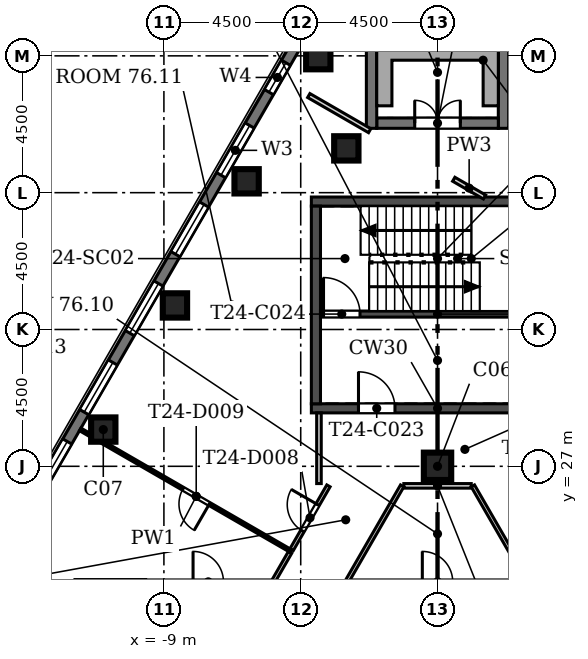
"""IFC4 building model, lengths in metres.
Left out: names, types, materials, properties, quantities, classifications, styles, units other than length and angle.
Written with IfcOpenShell. Run it as: python <this file> out.ifc"""

import sys

from ifc_helpers import new_model, si_unit, direction, frame, frame_2d, origin, origin_2d, place, context, subcontext, project, spatial, polyline, rectangle, outline, extrude, element, fill, save


model = new_model("IFC4")
c1 = context("Model", 3, precision=1e-05, world=origin(), true_north=direction((0.0, 1.0)))
c2 = subcontext(c1, "Body", "Model", "MODEL_VIEW")
j1 = project(units=[si_unit("LENGTHUNIT", "METRE"), si_unit("PLANEANGLEUNIT", "RADIAN")], contexts=[c1])
p1 = place(None, origin())
s1 = spatial("IfcSite", under=j1, at=p1, CompositionType="ELEMENT")
p2 = place(p1, origin())
s2 = spatial("IfcBuilding", under=s1, at=p2, CompositionType="ELEMENT")
p3 = place(p2, frame((0.0, 0.0, 335.1)))
s3 = spatial("IfcBuildingStorey", under=s2, at=p3, CompositionType="ELEMENT", Elevation=335.1)
for number, where, z_axis, x_axis in (
    (1, (-3.0, 37.457, 0.0), (0.0, 0.0, 1.0), (1.0, 0.0, 0.0)),
    (2, (-3.923, 40.457, 0.0), (0.0, 0.0, 1.0), (1.0, 0.0, 0.0)),
    (3, (-6.28, 36.374, 0.0), (0.0, 0.0, 1.0), (1.0, 0.0, 0.0)),
    (4, (-8.637, 32.291, 0.0), (0.0, 0.0, 1.0), (1.0, 0.0, 0.0)),
    (5, (-10.994, 28.208, 0.0), (0.0, 0.0, 1.0), (1.0, 0.0, 0.0)),
):
    element("IfcColumn", number, at=place(p3, frame(where, z_axis=z_axis, x_axis=x_axis)), inside=s3, PredefinedType="COLUMN", context=c2, shape_type="SweptSolid", body=[
        extrude(rectangle(XDim=0.8, YDim=0.8, at=origin_2d()), origin(), (0.0, 0.0, 1.0), 4.2),
    ])
p4 = place(p3, frame((0.0, 27.0, 0.0), z_axis=(0.0, 0.0, 1.0), x_axis=(1.0, 0.0, 0.0)))
e6 = element("IfcColumn", 6, at=p4, inside=s3, PredefinedType="COLUMN", context=c2, shape_type="SweptSolid", body=[
    extrude(rectangle(XDim=0.9, YDim=0.9, at=origin_2d()), origin(), (0.0, 0.0, 1.0), 4.2),
])
p5 = place(p3, origin())
e7 = element("IfcWall", 7, at=p5, inside=s3, PredefinedType="SOLIDWALL", context=c2, shape_type="SweptSolid", body=[
    extrude(outline(polyline([(2.341, 38.116), (2.0, 38.116), (2.0, 41.458), (2.0, 41.458), (2.341, 41.117), (2.341, 38.116)])), origin(), (0.0, 0.0, 1.0), 3.8),
])
p6 = place(p3, frame((2.0, 38.287, 0.0), z_axis=(0.0, 0.0, 1.0), x_axis=(-1.0, 0.0, 0.0)))
e8 = element("IfcWall", 8, at=p6, inside=s3, PredefinedType="SOLIDWALL", context=c2, shape_type="SweptSolid", body=[
    extrude(rectangle(XDim=4.0, YDim=0.34, at=frame_2d((2.0, 0.0))), origin(), (0.0, 0.0, 1.0), 3.8),
])
p7 = place(p6, frame((1.25, 0.0, 0.0)))
e9 = element("IfcOpeningElement", 9, at=p7, cuts=e8, PredefinedType="OPENING", context=c2, shape_type="SweptSolid", body=[
    extrude(rectangle(XDim=1.5, YDim=2.4, at=frame_2d((0.75, 1.2))), frame((0.0, 0.18, 0.0), z_axis=(0.0, -1.0, 0.0), x_axis=(1.0, 0.0, 0.0)), (0.0, 0.0, 1.0), 0.36),
])
p8 = place(p3, origin())
e10 = element("IfcWall", 10, at=p8, inside=s3, PredefinedType="SOLIDWALL", context=c2, shape_type="SweptSolid", body=[
    extrude(outline(polyline([(-2.0, 41.458), (-2.0, 38.116), (-2.341, 38.116), (-2.341, 41.117), (-2.0, 41.458), (-2.0, 41.458)])), origin(), (0.0, 0.0, 1.0), 3.8),
])
p9 = place(p3, frame((-4.353, 41.372, 0.0), z_axis=(0.0, 0.0, 1.0), x_axis=(-0.500001731347, -0.866024404189, 0.0)))
e11 = element("IfcWall", 11, at=p9, inside=s3, PredefinedType="SOLIDWALL", context=c2, shape_type="SweptSolid", body=[
    extrude(rectangle(XDim=38.87, YDim=0.34, at=frame_2d((19.435, 0.0))), origin(), (0.0, 0.0, 1.0), 3.8),
])
p10 = place(p9, frame((3.653, 0.0, 0.9)))
e12 = element("IfcOpeningElement", 12, at=p10, cuts=e11, PredefinedType="OPENING", context=c2, shape_type="SweptSolid", body=[
    extrude(rectangle(XDim=1.885, YDim=2.6, at=frame_2d((0.942, 1.3))), frame((0.0, 0.18, 0.0), z_axis=(0.0, -1.0, 0.0), x_axis=(1.0, 0.0, 0.0)), (0.0, 0.0, 1.0), 0.36),
])
p11 = place(p9, frame((6.653, 0.0, 0.9)))
e13 = element("IfcOpeningElement", 13, at=p11, cuts=e11, PredefinedType="OPENING", context=c2, shape_type="SweptSolid", body=[
    extrude(rectangle(XDim=1.885, YDim=2.6, at=frame_2d((0.942, 1.3))), frame((0.0, 0.18, 0.0), z_axis=(0.0, -1.0, 0.0), x_axis=(1.0, 0.0, 0.0)), (0.0, 0.0, 1.0), 0.36),
])
p12 = place(p9, frame((9.653, 0.0, 0.9)))
e14 = element("IfcOpeningElement", 14, at=p12, cuts=e11, PredefinedType="OPENING", context=c2, shape_type="SweptSolid", body=[
    extrude(rectangle(XDim=1.885, YDim=2.6, at=frame_2d((0.942, 1.3))), frame((0.0, 0.18, 0.0), z_axis=(0.0, -1.0, 0.0), x_axis=(1.0, 0.0, 0.0)), (0.0, 0.0, 1.0), 0.36),
])
p13 = place(p9, frame((12.653, 0.0, 0.9)))
e15 = element("IfcOpeningElement", 15, at=p13, cuts=e11, PredefinedType="OPENING", context=c2, shape_type="SweptSolid", body=[
    extrude(rectangle(XDim=1.885, YDim=2.6, at=frame_2d((0.942, 1.3))), frame((0.0, 0.18, 0.0), z_axis=(0.0, -1.0, 0.0), x_axis=(1.0, 0.0, 0.0)), (0.0, 0.0, 1.0), 0.36),
])
p14 = place(p9, frame((15.653, 0.0, 0.9)))
e16 = element("IfcOpeningElement", 16, at=p14, cuts=e11, PredefinedType="OPENING", context=c2, shape_type="SweptSolid", body=[
    extrude(rectangle(XDim=1.885, YDim=2.6, at=frame_2d((0.942, 1.3))), frame((0.0, 0.18, 0.0), z_axis=(0.0, -1.0, 0.0), x_axis=(1.0, 0.0, 0.0)), (0.0, 0.0, 1.0), 0.36),
])
p15 = place(p9, frame((18.653, 0.0, 0.9)))
e17 = element("IfcOpeningElement", 17, at=p15, cuts=e11, PredefinedType="OPENING", context=c2, shape_type="SweptSolid", body=[
    extrude(rectangle(XDim=1.885, YDim=2.6, at=frame_2d((0.942, 1.3))), frame((0.0, 0.18, 0.0), z_axis=(0.0, -1.0, 0.0), x_axis=(1.0, 0.0, 0.0)), (0.0, 0.0, 1.0), 0.36),
])
p16 = place(p9, frame((21.653, 0.0, 0.9)))
e18 = element("IfcOpeningElement", 18, at=p16, cuts=e11, PredefinedType="OPENING", context=c2, shape_type="SweptSolid", body=[
    extrude(rectangle(XDim=1.885, YDim=2.6, at=frame_2d((0.942, 1.3))), frame((0.0, 0.18, 0.0), z_axis=(0.0, -1.0, 0.0), x_axis=(1.0, 0.0, 0.0)), (0.0, 0.0, 1.0), 0.36),
])
p17 = place(p9, frame((24.653, 0.0, 0.9)))
e19 = element("IfcOpeningElement", 19, at=p17, cuts=e11, PredefinedType="OPENING", context=c2, shape_type="SweptSolid", body=[
    extrude(rectangle(XDim=1.885, YDim=2.6, at=frame_2d((0.942, 1.3))), frame((0.0, 0.18, 0.0), z_axis=(0.0, -1.0, 0.0), x_axis=(1.0, 0.0, 0.0)), (0.0, 0.0, 1.0), 0.36),
])
p18 = place(p9, frame((27.653, 0.0, 0.9)))
e20 = element("IfcOpeningElement", 20, at=p18, cuts=e11, PredefinedType="OPENING", context=c2, shape_type="SweptSolid", body=[
    extrude(rectangle(XDim=1.885, YDim=2.6, at=frame_2d((0.942, 1.3))), frame((0.0, 0.18, 0.0), z_axis=(0.0, -1.0, 0.0), x_axis=(1.0, 0.0, 0.0)), (0.0, 0.0, 1.0), 0.36),
])
p19 = place(p9, frame((30.653, 0.0, 0.9)))
e21 = element("IfcOpeningElement", 21, at=p19, cuts=e11, PredefinedType="OPENING", context=c2, shape_type="SweptSolid", body=[
    extrude(rectangle(XDim=1.885, YDim=2.6, at=frame_2d((0.942, 1.3))), frame((0.0, 0.18, 0.0), z_axis=(0.0, -1.0, 0.0), x_axis=(1.0, 0.0, 0.0)), (0.0, 0.0, 1.0), 0.36),
])
p20 = place(p9, frame((33.653, 0.0, 0.9)))
e22 = element("IfcOpeningElement", 22, at=p20, cuts=e11, PredefinedType="OPENING", context=c2, shape_type="SweptSolid", body=[
    extrude(rectangle(XDim=1.885, YDim=2.6, at=frame_2d((0.942, 1.3))), frame((0.0, 0.18, 0.0), z_axis=(0.0, -1.0, 0.0), x_axis=(1.0, 0.0, 0.0)), (0.0, 0.0, 1.0), 0.36),
])
p21 = place(p9, frame((1.269, 0.0, 0.9)))
e23 = element("IfcOpeningElement", 23, at=p21, cuts=e11, PredefinedType="OPENING", context=c2, shape_type="SweptSolid", body=[
    extrude(rectangle(XDim=1.115, YDim=2.4, at=frame_2d((0.558, 1.2))), frame((0.0, 0.18, 0.0), z_axis=(0.0, -1.0, 0.0), x_axis=(1.0, 0.0, 0.0)), (0.0, 0.0, 1.0), 0.36),
])
p22 = place(p9, frame((36.646, 0.0, 0.9)))
e24 = element("IfcOpeningElement", 24, at=p22, cuts=e11, PredefinedType="OPENING", context=c2, shape_type="SweptSolid", body=[
    extrude(rectangle(XDim=1.115, YDim=2.4, at=frame_2d((0.558, 1.2))), frame((0.0, 0.18, 0.0), z_axis=(0.0, -1.0, 0.0), x_axis=(1.0, 0.0, 0.0)), (0.0, 0.0, 1.0), 0.36),
])
p23 = place(p3, origin())
e25 = element("IfcWall", 25, at=p23, inside=s3, PredefinedType="USERDEFINED", context=c2, shape_type="SweptSolid", body=[
    extrude(outline(polyline([(-1.5, 40.857), (-2.0, 40.857), (-2.0, 40.357), (-2.0, 38.857), (-1.5, 38.857), (-1.5, 40.357), (1.5, 40.357), (1.5, 38.857), (2.0, 38.857), (2.0, 40.357), (2.0, 40.857), (1.5, 40.857), (-1.5, 40.857)])), origin(), (0.0, 0.0, 1.0), 1.1),
])
p24 = place(p3, frame((-4.15, 28.907, -0.4), z_axis=(0.0, 0.0, 1.0), x_axis=(1.0, 0.0, 0.0)))
e26 = element("IfcWall", 26, at=p24, inside=s3, PredefinedType="SOLIDWALL", context=c2, shape_type="SweptSolid", body=[
    extrude(rectangle(XDim=8.3, YDim=0.3, at=frame_2d((4.15, 0.0))), origin(), (0.0, 0.0, 1.0), 4.2),
])
p25 = place(p24, frame((1.55, 0.0, 0.4)))
e27 = element("IfcOpeningElement", 27, at=p25, cuts=e26, PredefinedType="OPENING", context=c2, shape_type="SweptSolid", body=[
    extrude(rectangle(XDim=1.2, YDim=2.1, at=frame_2d((0.6, 1.05))), frame((0.0, 0.16, 0.0), z_axis=(0.0, -1.0, 0.0), x_axis=(1.0, 0.0, 0.0)), (0.0, 0.0, 1.0), 0.32),
])
p26 = place(p3, frame((-4.15, 35.707, -0.4), z_axis=(0.0, 0.0, 1.0), x_axis=(1.0, 0.0, 0.0)))
e28 = element("IfcWall", 28, at=p26, inside=s3, PredefinedType="SOLIDWALL", context=c2, shape_type="SweptSolid", body=[
    extrude(rectangle(XDim=8.3, YDim=0.3, at=frame_2d((4.15, 0.0))), origin(), (0.0, 0.0, 1.0), 4.2),
])
p27 = place(p3, frame((-4.0, 29.057, -0.4), z_axis=(0.0, 0.0, 1.0), x_axis=(0.0, 1.0, 0.0)))
e29 = element("IfcWall", 29, at=p27, inside=s3, PredefinedType="SOLIDWALL", context=c2, shape_type="SweptSolid", body=[
    extrude(rectangle(XDim=6.5, YDim=0.3, at=frame_2d((3.25, 0.0))), origin(), (0.0, 0.0, 1.0), 4.2),
])
p28 = place(p3, frame((-3.85, 32.007, -0.4), z_axis=(0.0, 0.0, 1.0), x_axis=(1.0, 0.0, 0.0)))
e30 = element("IfcWall", 30, at=p28, inside=s3, PredefinedType="SOLIDWALL", context=c2, shape_type="SweptSolid", body=[
    extrude(rectangle(XDim=7.7, YDim=0.2, at=frame_2d((3.85, 0.0))), origin(), (0.0, 0.0, 1.0), 4.2),
])
p29 = place(p28, frame((0.1, 0.0, 0.4)))
e31 = element("IfcOpeningElement", 31, at=p29, cuts=e30, PredefinedType="OPENING", context=c2, shape_type="SweptSolid", body=[
    extrude(rectangle(XDim=1.2, YDim=2.1, at=frame_2d((0.6, 1.05))), frame((0.0, 0.11, 0.0), z_axis=(0.0, -1.0, 0.0), x_axis=(1.0, 0.0, 0.0)), (0.0, 0.0, 1.0), 0.22),
])
p30 = place(p3, frame((1.109, 26.357, 0.0), z_axis=(0.0, 0.0, 1.0), x_axis=(-1.0, 0.0, 0.0)))
e32 = element("IfcWall", 32, at=p30, inside=s3, PredefinedType="PARTITIONING", context=c2, shape_type="SweptSolid", body=[
    extrude(rectangle(XDim=2.218, YDim=0.15, at=frame_2d((1.109, 0.0))), origin(), (0.0, 0.0, 1.0), 3.8),
])
p31 = place(p3, frame((-3.9, 26.432, 0.0), z_axis=(0.0, 0.0, 1.0), x_axis=(0.0, 1.0, 0.0)))
e33 = element("IfcWall", 33, at=p31, inside=s3, PredefinedType="PARTITIONING", context=c2, shape_type="SweptSolid", body=[
    extrude(rectangle(XDim=2.325, YDim=0.15, at=frame_2d((1.163, 0.0))), origin(), (0.0, 0.0, 1.0), 3.8),
])
p32 = place(p3, frame((-1.163, 26.357, 0.0), z_axis=(0.0, 0.0, 1.0), x_axis=(-0.500014248385, -0.866017177319, 0.0)))
e34 = element("IfcWall", 34, at=p32, inside=s3, PredefinedType="PARTITIONING", context=c2, shape_type="SweptSolid", body=[
    extrude(rectangle(XDim=3.646, YDim=0.125, at=frame_2d((1.823, 0.0))), origin(), (0.0, 0.0, 1.0), 3.8),
])
p33 = place(p3, frame((-4.8, 24.258, 0.0), z_axis=(0.0, 0.0, 1.0), x_axis=(0.499995647607, 0.866027916625, 0.0)))
e35 = element("IfcWall", 35, at=p33, inside=s3, PredefinedType="PARTITIONING", context=c2, shape_type="SweptSolid", body=[
    extrude(rectangle(XDim=2.424, YDim=0.125, at=frame_2d((1.212, 0.0))), origin(), (0.0, 0.0, 1.0), 3.8),
])
p34 = place(p33, frame((0.712, 0.0, 0.0)))
e36 = element("IfcOpeningElement", 36, at=p34, cuts=e35, PredefinedType="OPENING", context=c2, shape_type="SweptSolid", body=[
    extrude(rectangle(XDim=1.0, YDim=2.1, at=frame_2d((0.5, 1.05))), frame((0.0, 0.073, 0.0), z_axis=(0.0, -1.0, 0.0), x_axis=(1.0, 0.0, 0.0)), (0.0, 0.0, 1.0), 0.145),
])
p35 = place(p3, frame((-5.41, 23.2, 0.0), z_axis=(0.0, 0.0, 1.0), x_axis=(0.500005339912, 0.866022320763, 0.0)))
e37 = element("IfcWall", 37, at=p35, inside=s3, PredefinedType="PARTITIONING", context=c2, shape_type="SweptSolid", body=[
    extrude(rectangle(XDim=1.121, YDim=0.125, at=frame_2d((0.56, 0.0))), origin(), (0.0, 0.0, 1.0), 3.8),
])
p36 = place(p3, frame((2.985, 23.2, 0.0), z_axis=(0.0, 0.0, 1.0), x_axis=(-0.500014248385, 0.866017177319, 0.0)))
e38 = element("IfcWall", 38, at=p36, inside=s3, PredefinedType="PARTITIONING", context=c2, shape_type="SweptSolid", body=[
    extrude(rectangle(XDim=3.646, YDim=0.125, at=frame_2d((1.823, 0.0))), origin(), (0.0, 0.0, 1.0), 3.8),
])
p37 = place(p3, frame((1.546, 35.857, 0.0), z_axis=(0.0, 0.0, 1.0), x_axis=(-0.86601174498, 0.500023656998, 0.0)))
e39 = element("IfcWall", 39, at=p37, inside=s3, PredefinedType="PARTITIONING", context=c2, shape_type="SweptSolid", body=[
    extrude(rectangle(XDim=1.169, YDim=0.15, at=frame_2d((0.585, 0.0))), origin(), (0.0, 0.0, 1.0), 3.8),
])
p38 = place(p3, frame((-2.232, 38.038, 0.0), z_axis=(0.0, 0.0, 1.0), x_axis=(-0.865994042453, 0.500054315485, 0.0)))
e40 = element("IfcWall", 40, at=p38, inside=s3, PredefinedType="PARTITIONING", context=c2, shape_type="SweptSolid", body=[
    extrude(rectangle(XDim=2.314, YDim=0.15, at=frame_2d((1.157, 0.0))), origin(), (0.0, 0.0, 1.0), 3.8),
])
p39 = place(p3, frame((-4.825, 24.214, 0.0), z_axis=(0.0, 0.0, 1.0), x_axis=(-0.866037970569, 0.499978233058, 0.0)))
e41 = element("IfcWall", 41, at=p39, inside=s3, PredefinedType="PARTITIONING", context=c2, shape_type="SweptSolid", body=[
    extrude(rectangle(XDim=7.188, YDim=0.1, at=frame_2d((3.594, 0.0))), origin(), (0.0, 0.0, 1.0), 3.8),
])
p40 = place(p39, frame((3.094, 0.0, 0.0)))
e42 = element("IfcOpeningElement", 42, at=p40, cuts=e41, PredefinedType="OPENING", context=c2, shape_type="SweptSolid", body=[
    extrude(rectangle(XDim=1.0, YDim=2.1, at=frame_2d((0.5, 1.05))), frame((0.0, 0.06, 0.0), z_axis=(0.0, -1.0, 0.0), x_axis=(1.0, 0.0, 0.0)), (0.0, 0.0, 1.0), 0.12),
])
p41 = place(p3, frame((-11.394, 28.007, 0.0), z_axis=(0.0, 0.0, 1.0), x_axis=(-0.865950118807, 0.50013037474, 0.0)))
e43 = element("IfcWall", 43, at=p41, inside=s3, PredefinedType="PARTITIONING", context=c2, shape_type="SweptSolid", body=[
    extrude(rectangle(XDim=0.415, YDim=0.1, at=frame_2d((0.207, 0.0))), origin(), (0.0, 0.0, 1.0), 3.8),
])
p42 = place(p7, frame((1.5, 0.0, 0.0), z_axis=(0.0, 0.0, 1.0), x_axis=(-1.0, 0.0, 0.0)))
e44 = element("IfcDoor", 44, at=p42, inside=s3, OperationType="DOUBLE_DOOR_SINGLE_SWING", PredefinedType="DOOR", context=c2, shape_type="SweptSolid", body=[
    extrude(rectangle(XDim=1.5, YDim=2.4, at=frame_2d((0.75, 1.2))), frame((0.0, 0.025, 0.0), z_axis=(0.0, -1.0, 0.0), x_axis=(1.0, 0.0, 0.0)), (0.0, 0.0, 1.0), 0.05),
])
fill(e9, e44)
p43 = place(p10, origin())
e45 = element("IfcWindow", 45, at=p43, inside=s3, PartitioningType="SINGLE_PANEL", PredefinedType="WINDOW", context=c2, shape_type="SweptSolid", body=[
    extrude(rectangle(XDim=1.885, YDim=2.6, at=frame_2d((0.942, 1.3))), frame((0.0, 0.11, 0.0), z_axis=(0.0, -1.0, 0.0), x_axis=(1.0, 0.0, 0.0)), (0.0, 0.0, 1.0), 0.06),
])
fill(e12, e45)
p44 = place(p11, origin())
e46 = element("IfcWindow", 46, at=p44, inside=s3, PartitioningType="SINGLE_PANEL", PredefinedType="WINDOW", context=c2, shape_type="SweptSolid", body=[
    extrude(rectangle(XDim=1.885, YDim=2.6, at=frame_2d((0.942, 1.3))), frame((0.0, 0.11, 0.0), z_axis=(0.0, -1.0, 0.0), x_axis=(1.0, 0.0, 0.0)), (0.0, 0.0, 1.0), 0.06),
])
fill(e13, e46)
p45 = place(p12, origin())
e47 = element("IfcWindow", 47, at=p45, inside=s3, PartitioningType="SINGLE_PANEL", PredefinedType="WINDOW", context=c2, shape_type="SweptSolid", body=[
    extrude(rectangle(XDim=1.885, YDim=2.6, at=frame_2d((0.942, 1.3))), frame((0.0, 0.11, 0.0), z_axis=(0.0, -1.0, 0.0), x_axis=(1.0, 0.0, 0.0)), (0.0, 0.0, 1.0), 0.06),
])
fill(e14, e47)
p46 = place(p13, origin())
e48 = element("IfcWindow", 48, at=p46, inside=s3, PartitioningType="SINGLE_PANEL", PredefinedType="WINDOW", context=c2, shape_type="SweptSolid", body=[
    extrude(rectangle(XDim=1.885, YDim=2.6, at=frame_2d((0.942, 1.3))), frame((0.0, 0.11, 0.0), z_axis=(0.0, -1.0, 0.0), x_axis=(1.0, 0.0, 0.0)), (0.0, 0.0, 1.0), 0.06),
])
fill(e15, e48)
p47 = place(p14, origin())
e49 = element("IfcWindow", 49, at=p47, inside=s3, PartitioningType="SINGLE_PANEL", PredefinedType="WINDOW", context=c2, shape_type="SweptSolid", body=[
    extrude(rectangle(XDim=1.885, YDim=2.6, at=frame_2d((0.942, 1.3))), frame((0.0, 0.11, 0.0), z_axis=(0.0, -1.0, 0.0), x_axis=(1.0, 0.0, 0.0)), (0.0, 0.0, 1.0), 0.06),
])
fill(e16, e49)
p48 = place(p21, origin())
e50 = element("IfcWindow", 50, at=p48, inside=s3, PartitioningType="SINGLE_PANEL", PredefinedType="WINDOW", context=c2, shape_type="SweptSolid", body=[
    extrude(rectangle(XDim=1.115, YDim=2.4, at=frame_2d((0.558, 1.2))), frame((0.0, 0.11, 0.0), z_axis=(0.0, -1.0, 0.0), x_axis=(1.0, 0.0, 0.0)), (0.0, 0.0, 1.0), 0.06),
])
fill(e23, e50)
p49 = place(p25, origin())
e51 = element("IfcDoor", 51, at=p49, inside=s3, OperationType="SINGLE_SWING_LEFT", PredefinedType="DOOR", context=c2, shape_type="SweptSolid", body=[
    extrude(rectangle(XDim=1.2, YDim=2.1, at=frame_2d((0.6, 1.05))), frame((0.0, 0.025, 0.0), z_axis=(0.0, -1.0, 0.0), x_axis=(1.0, 0.0, 0.0)), (0.0, 0.0, 1.0), 0.05),
])
fill(e27, e51)
p50 = place(p29, origin())
e52 = element("IfcDoor", 52, at=p50, inside=s3, OperationType="SINGLE_SWING_LEFT", PredefinedType="DOOR", context=c2, shape_type="SweptSolid", body=[
    extrude(rectangle(XDim=1.2, YDim=2.1, at=frame_2d((0.6, 1.05))), frame((0.0, 0.025, 0.0), z_axis=(0.0, -1.0, 0.0), x_axis=(1.0, 0.0, 0.0)), (0.0, 0.0, 1.0), 0.05),
])
fill(e31, e52)
p51 = place(p34, origin())
e53 = element("IfcDoor", 53, at=p51, inside=s3, OperationType="SINGLE_SWING_RIGHT", PredefinedType="DOOR", context=c2, shape_type="SweptSolid", body=[
    extrude(rectangle(XDim=1.0, YDim=2.1, at=frame_2d((0.5, 1.05))), frame((0.0, 0.025, 0.0), z_axis=(0.0, -1.0, 0.0), x_axis=(1.0, 0.0, 0.0)), (0.0, 0.0, 1.0), 0.05),
])
fill(e36, e53)
p52 = place(p40, origin())
e54 = element("IfcDoor", 54, at=p52, inside=s3, OperationType="SINGLE_SWING_LEFT", PredefinedType="DOOR", context=c2, shape_type="SweptSolid", body=[
    extrude(rectangle(XDim=1.0, YDim=2.1, at=frame_2d((0.5, 1.05))), frame((0.0, 0.025, 0.0), z_axis=(0.0, -1.0, 0.0), x_axis=(1.0, 0.0, 0.0)), (0.0, 0.0, 1.0), 0.05),
])
fill(e42, e54)
save(model, sys.argv[1])
